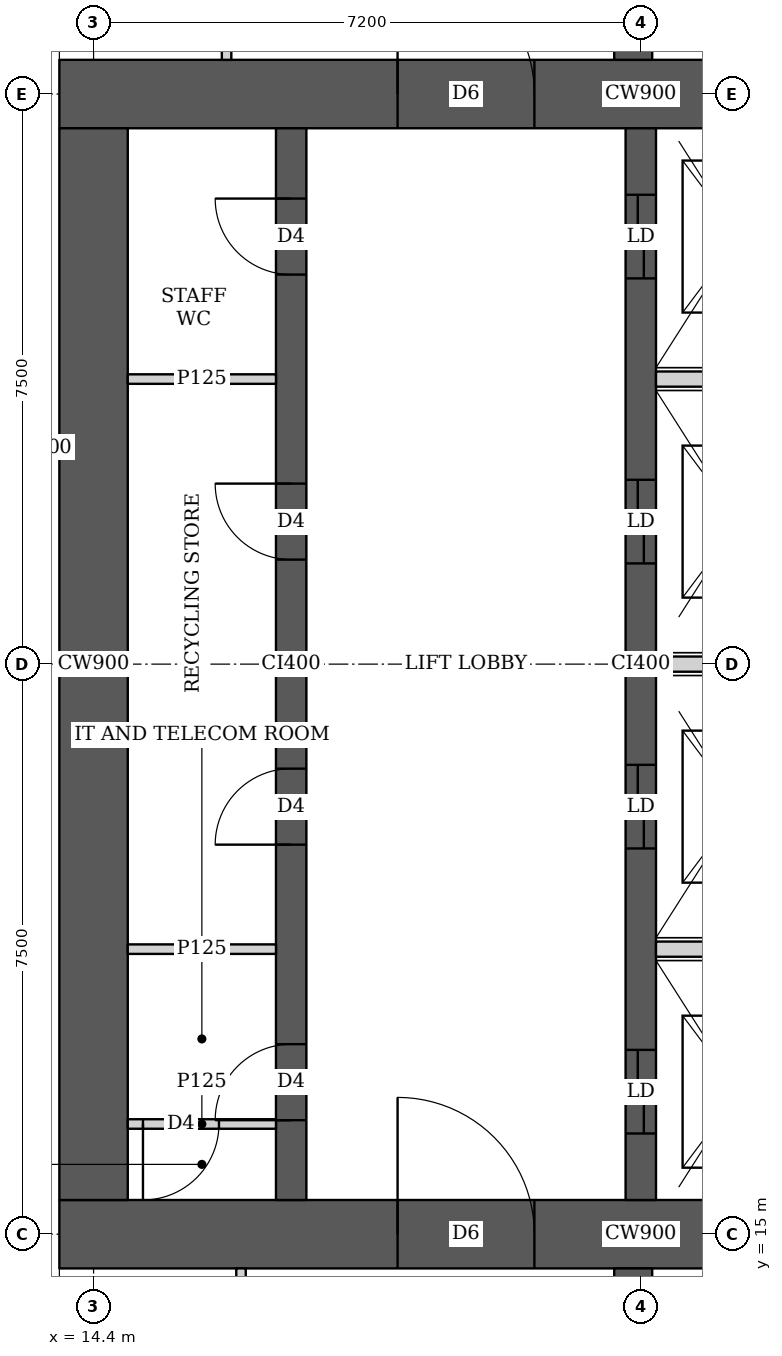
"""IFC4 building model, lengths in metres.
Left out: names, types, materials, properties, quantities, classifications, styles, units other than length and angle.
Written with IfcOpenShell. Run it as: python <this file> out.ifc"""

import sys

from ifc_helpers import new_model, si_unit, direction, frame, frame_2d, origin, place, context, subcontext, project, spatial, rectangle, extrude, element, fill, save


model = new_model("IFC4")
c1 = context("Model", 3, precision=1e-05, world=origin(), true_north=direction((0.0, 1.0)))
c2 = subcontext(c1, "Body", "Model", "MODEL_VIEW")
j1 = project(units=[si_unit("LENGTHUNIT", "METRE"), si_unit("PLANEANGLEUNIT", "RADIAN")], contexts=[c1])
p1 = place(None, origin())
s1 = spatial("IfcSite", under=j1, at=p1, CompositionType="ELEMENT")
p2 = place(p1, origin())
s2 = spatial("IfcBuilding", under=s1, at=p2, CompositionType="ELEMENT")
p3 = place(p2, frame((0.0, 0.0, 292.85)))
s3 = spatial("IfcBuildingStorey", under=s2, at=p3, CompositionType="ELEMENT", Elevation=292.85)
p4 = place(p3, frame((13.95, 15.0, 0.0), z_axis=(0.0, 0.0, 1.0), x_axis=(1.0, 0.0, 0.0)))
e1 = element("IfcWall", 1, at=p4, inside=s3, PredefinedType="SHEAR", context=c2, shape_type="SweptSolid", body=[
    extrude(rectangle(XDim=15.3, YDim=0.9, at=frame_2d((7.65, 0.0))), origin(), (0.0, 0.0, 1.0), 3.75),
])
p5 = place(p4, frame((4.45, 0.0, 0.0)))
e2 = element("IfcOpeningElement", 2, at=p5, cuts=e1, PredefinedType="OPENING", context=c2, shape_type="SweptSolid", body=[
    extrude(rectangle(XDim=1.8, YDim=2.1, at=frame_2d((0.9, 1.05))), frame((0.0, 0.46, 0.0), z_axis=(0.0, -1.0, 0.0), x_axis=(1.0, 0.0, 0.0)), (0.0, 0.0, 1.0), 0.92),
])
p6 = place(p4, frame((10.7, 0.0, 0.0)))
e3 = element("IfcOpeningElement", 3, at=p6, cuts=e1, PredefinedType="OPENING", context=c2, shape_type="SweptSolid", body=[
    extrude(rectangle(XDim=1.1, YDim=2.1, at=frame_2d((0.55, 1.05))), frame((0.0, 0.46, 0.0), z_axis=(0.0, -1.0, 0.0), x_axis=(1.0, 0.0, 0.0)), (0.0, 0.0, 1.0), 0.92),
])
p7 = place(p3, frame((13.95, 30.0, 0.0), z_axis=(0.0, 0.0, 1.0), x_axis=(1.0, 0.0, 0.0)))
e4 = element("IfcWall", 4, at=p7, inside=s3, PredefinedType="SHEAR", context=c2, shape_type="SweptSolid", body=[
    extrude(rectangle(XDim=15.3, YDim=0.9, at=frame_2d((7.65, 0.0))), origin(), (0.0, 0.0, 1.0), 3.75),
])
p8 = place(p7, frame((4.45, 0.0, 0.0)))
e5 = element("IfcOpeningElement", 5, at=p8, cuts=e4, PredefinedType="OPENING", context=c2, shape_type="SweptSolid", body=[
    extrude(rectangle(XDim=1.8, YDim=2.1, at=frame_2d((0.9, 1.05))), frame((0.0, 0.46, 0.0), z_axis=(0.0, -1.0, 0.0), x_axis=(1.0, 0.0, 0.0)), (0.0, 0.0, 1.0), 0.92),
])
p9 = place(p7, frame((10.7, 0.0, 0.0)))
e6 = element("IfcOpeningElement", 6, at=p9, cuts=e4, PredefinedType="OPENING", context=c2, shape_type="SweptSolid", body=[
    extrude(rectangle(XDim=1.1, YDim=2.1, at=frame_2d((0.55, 1.05))), frame((0.0, 0.46, 0.0), z_axis=(0.0, -1.0, 0.0), x_axis=(1.0, 0.0, 0.0)), (0.0, 0.0, 1.0), 0.92),
])
p10 = place(p3, frame((14.4, 15.45, 0.0), z_axis=(0.0, 0.0, 1.0), x_axis=(0.0, 1.0, 0.0)))
e7 = element("IfcWall", 7, at=p10, inside=s3, PredefinedType="SHEAR", context=c2, shape_type="SweptSolid", body=[
    extrude(rectangle(XDim=14.1, YDim=0.9, at=frame_2d((7.05, 0.0))), origin(), (0.0, 0.0, 1.0), 3.75),
])
p11 = place(p3, frame((17.0, 15.45, 0.0), z_axis=(0.0, 0.0, 1.0), x_axis=(0.0, 1.0, 0.0)))
e8 = element("IfcWall", 8, at=p11, inside=s3, PredefinedType="SHEAR", context=c2, shape_type="SweptSolid", body=[
    extrude(rectangle(XDim=14.1, YDim=0.4, at=frame_2d((7.05, 0.0))), origin(), (0.0, 0.0, 1.0), 3.75),
])
p12 = place(p11, frame((1.05, 0.0, 0.0)))
e9 = element("IfcOpeningElement", 9, at=p12, cuts=e8, PredefinedType="OPENING", context=c2, shape_type="SweptSolid", body=[
    extrude(rectangle(XDim=1.0, YDim=2.1, at=frame_2d((0.5, 1.05))), frame((0.0, 0.21, 0.0), z_axis=(0.0, -1.0, 0.0), x_axis=(1.0, 0.0, 0.0)), (0.0, 0.0, 1.0), 0.42),
])
p13 = place(p11, frame((4.675, 0.0, 0.0)))
e10 = element("IfcOpeningElement", 10, at=p13, cuts=e8, PredefinedType="OPENING", context=c2, shape_type="SweptSolid", body=[
    extrude(rectangle(XDim=1.0, YDim=2.1, at=frame_2d((0.5, 1.05))), frame((0.0, 0.21, 0.0), z_axis=(0.0, -1.0, 0.0), x_axis=(1.0, 0.0, 0.0)), (0.0, 0.0, 1.0), 0.42),
])
p14 = place(p11, frame((8.425, 0.0, 0.0)))
e11 = element("IfcOpeningElement", 11, at=p14, cuts=e8, PredefinedType="OPENING", context=c2, shape_type="SweptSolid", body=[
    extrude(rectangle(XDim=1.0, YDim=2.1, at=frame_2d((0.5, 1.05))), frame((0.0, 0.21, 0.0), z_axis=(0.0, -1.0, 0.0), x_axis=(1.0, 0.0, 0.0)), (0.0, 0.0, 1.0), 0.42),
])
p15 = place(p11, frame((12.175, 0.0, 0.0)))
e12 = element("IfcOpeningElement", 12, at=p15, cuts=e8, PredefinedType="OPENING", context=c2, shape_type="SweptSolid", body=[
    extrude(rectangle(XDim=1.0, YDim=2.1, at=frame_2d((0.5, 1.05))), frame((0.0, 0.21, 0.0), z_axis=(0.0, -1.0, 0.0), x_axis=(1.0, 0.0, 0.0)), (0.0, 0.0, 1.0), 0.42),
])
p16 = place(p3, frame((21.6, 15.45, 0.0), z_axis=(0.0, 0.0, 1.0), x_axis=(0.0, 1.0, 0.0)))
e13 = element("IfcWall", 13, at=p16, inside=s3, PredefinedType="SHEAR", context=c2, shape_type="SweptSolid", body=[
    extrude(rectangle(XDim=14.1, YDim=0.4, at=frame_2d((7.05, 0.0))), origin(), (0.0, 0.0, 1.0), 3.75),
])
p17 = place(p16, frame((0.875, 0.0, 0.0)))
e14 = element("IfcOpeningElement", 14, at=p17, cuts=e13, PredefinedType="OPENING", context=c2, shape_type="SweptSolid", body=[
    extrude(rectangle(XDim=1.1, YDim=2.1, at=frame_2d((0.55, 1.05))), frame((0.0, 0.21, 0.0), z_axis=(0.0, -1.0, 0.0), x_axis=(1.0, 0.0, 0.0)), (0.0, 0.0, 1.0), 0.42),
])
p18 = place(p16, frame((4.625, 0.0, 0.0)))
e15 = element("IfcOpeningElement", 15, at=p18, cuts=e13, PredefinedType="OPENING", context=c2, shape_type="SweptSolid", body=[
    extrude(rectangle(XDim=1.1, YDim=2.1, at=frame_2d((0.55, 1.05))), frame((0.0, 0.21, 0.0), z_axis=(0.0, -1.0, 0.0), x_axis=(1.0, 0.0, 0.0)), (0.0, 0.0, 1.0), 0.42),
])
p19 = place(p16, frame((8.375, 0.0, 0.0)))
e16 = element("IfcOpeningElement", 16, at=p19, cuts=e13, PredefinedType="OPENING", context=c2, shape_type="SweptSolid", body=[
    extrude(rectangle(XDim=1.1, YDim=2.1, at=frame_2d((0.55, 1.05))), frame((0.0, 0.21, 0.0), z_axis=(0.0, -1.0, 0.0), x_axis=(1.0, 0.0, 0.0)), (0.0, 0.0, 1.0), 0.42),
])
p20 = place(p16, frame((12.125, 0.0, 0.0)))
e17 = element("IfcOpeningElement", 17, at=p20, cuts=e13, PredefinedType="OPENING", context=c2, shape_type="SweptSolid", body=[
    extrude(rectangle(XDim=1.1, YDim=2.1, at=frame_2d((0.55, 1.05))), frame((0.0, 0.21, 0.0), z_axis=(0.0, -1.0, 0.0), x_axis=(1.0, 0.0, 0.0)), (0.0, 0.0, 1.0), 0.42),
])
for number, where, z_axis, x_axis in (
    (18, (21.5, 10.35, 0.0), (0.0, 0.0, 1.0), (0.0, 1.0, 0.0)),
    (19, (21.5, 30.45, 0.0), (0.0, 0.0, 1.0), (0.0, 1.0, 0.0)),
):
    element("IfcWall", number, at=place(p3, frame(where, z_axis=z_axis, x_axis=x_axis)), inside=s3, PredefinedType="SHEAR", context=c2, shape_type="SweptSolid", body=[
        extrude(rectangle(XDim=4.2, YDim=0.5, at=frame_2d((2.1, 0.0))), origin(), (0.0, 0.0, 1.0), 3.75),
    ])
p21 = place(p3, frame((16.34, 10.562, 0.0), z_axis=(0.0, 0.0, 1.0), x_axis=(0.0, 1.0, 0.0)))
e20 = element("IfcWall", 20, at=p21, inside=s3, PredefinedType="PARTITIONING", context=c2, shape_type="SweptSolid", body=[
    extrude(rectangle(XDim=3.988, YDim=0.125, at=frame_2d((1.994, 0.0))), origin(), (0.0, 0.0, 1.0), 3.4),
])
p22 = place(p21, frame((1.438, 0.0, 0.0)))
e21 = element("IfcOpeningElement", 21, at=p22, cuts=e20, PredefinedType="OPENING", context=c2, shape_type="SweptSolid", body=[
    extrude(rectangle(XDim=1.0, YDim=2.1, at=frame_2d((0.5, 1.05))), frame((0.0, 0.073, 0.0), z_axis=(0.0, -1.0, 0.0), x_axis=(1.0, 0.0, 0.0)), (0.0, 0.0, 1.0), 0.145),
])
p23 = place(p3, frame((16.15, 30.45, 0.0), z_axis=(0.0, 0.0, 1.0), x_axis=(0.0, 1.0, 0.0)))
e22 = element("IfcWall", 22, at=p23, inside=s3, PredefinedType="PARTITIONING", context=c2, shape_type="SweptSolid", body=[
    extrude(rectangle(XDim=4.387, YDim=0.125, at=frame_2d((2.193, 0.0))), origin(), (0.0, 0.0, 1.0), 3.4),
])
p24 = place(p23, frame((1.75, 0.0, 0.0)))
e23 = element("IfcOpeningElement", 23, at=p24, cuts=e22, PredefinedType="OPENING", context=c2, shape_type="SweptSolid", body=[
    extrude(rectangle(XDim=1.0, YDim=2.1, at=frame_2d((0.5, 1.05))), frame((0.0, 0.073, 0.0), z_axis=(0.0, -1.0, 0.0), x_axis=(1.0, 0.0, 0.0)), (0.0, 0.0, 1.0), 0.145),
])
p25 = place(p3, frame((14.85, 16.45, 0.0), z_axis=(0.0, 0.0, 1.0), x_axis=(1.0, 0.0, 0.0)))
e24 = element("IfcWall", 24, at=p25, inside=s3, PredefinedType="PARTITIONING", context=c2, shape_type="SweptSolid", body=[
    extrude(rectangle(XDim=1.95, YDim=0.125, at=frame_2d((0.975, 0.0))), origin(), (0.0, 0.0, 1.0), 3.4),
])
p26 = place(p25, frame((0.2, 0.0, 0.0)))
e25 = element("IfcOpeningElement", 25, at=p26, cuts=e24, PredefinedType="OPENING", context=c2, shape_type="SweptSolid", body=[
    extrude(rectangle(XDim=1.0, YDim=2.1, at=frame_2d((0.5, 1.05))), frame((0.0, 0.073, 0.0), z_axis=(0.0, -1.0, 0.0), x_axis=(1.0, 0.0, 0.0)), (0.0, 0.0, 1.0), 0.145),
])
for number, where, z_axis, x_axis in (
    (26, (14.85, 18.75, 0.0), (0.0, 0.0, 1.0), (1.0, 0.0, 0.0)),
    (27, (14.85, 26.25, 0.0), (0.0, 0.0, 1.0), (1.0, 0.0, 0.0)),
):
    element("IfcWall", number, at=place(p3, frame(where, z_axis=z_axis, x_axis=x_axis)), inside=s3, PredefinedType="PARTITIONING", context=c2, shape_type="SweptSolid", body=[
        extrude(rectangle(XDim=1.95, YDim=0.125, at=frame_2d((0.975, 0.0))), origin(), (0.0, 0.0, 1.0), 3.4),
    ])
for number, where, z_axis, x_axis in (
    (28, (21.8, 18.75, 0.0), (0.0, 0.0, 1.0), (1.0, 0.0, 0.0)),
    (29, (21.8, 22.5, 0.0), (0.0, 0.0, 1.0), (1.0, 0.0, 0.0)),
    (30, (21.8, 26.25, 0.0), (0.0, 0.0, 1.0), (1.0, 0.0, 0.0)),
):
    element("IfcWall", number, at=place(p3, frame(where, z_axis=z_axis, x_axis=x_axis)), inside=s3, PredefinedType="SOLIDWALL", context=c2, shape_type="SweptSolid", body=[
        extrude(rectangle(XDim=2.2, YDim=0.2, at=frame_2d((1.1, 0.0))), origin(), (0.0, 0.0, 1.0), 3.4),
    ])
p27 = place(p26, origin())
e31 = element("IfcDoor", 31, at=p27, inside=s3, OperationType="SINGLE_SWING_RIGHT", PredefinedType="DOOR", context=c2, shape_type="SweptSolid", body=[
    extrude(rectangle(XDim=1.0, YDim=2.1, at=frame_2d((0.5, 1.05))), frame((0.0, 0.025, 0.0), z_axis=(0.0, -1.0, 0.0), x_axis=(1.0, 0.0, 0.0)), (0.0, 0.0, 1.0), 0.05),
])
fill(e25, e31)
p28 = place(p12, origin())
e32 = element("IfcDoor", 32, at=p28, inside=s3, OperationType="SINGLE_SWING_LEFT", PredefinedType="DOOR", context=c2, shape_type="SweptSolid", body=[
    extrude(rectangle(XDim=1.0, YDim=2.1, at=frame_2d((0.5, 1.05))), frame((0.0, 0.025, 0.0), z_axis=(0.0, -1.0, 0.0), x_axis=(1.0, 0.0, 0.0)), (0.0, 0.0, 1.0), 0.05),
])
fill(e9, e32)
p29 = place(p13, origin())
e33 = element("IfcDoor", 33, at=p29, inside=s3, OperationType="SINGLE_SWING_LEFT", PredefinedType="DOOR", context=c2, shape_type="SweptSolid", body=[
    extrude(rectangle(XDim=1.0, YDim=2.1, at=frame_2d((0.5, 1.05))), frame((0.0, 0.025, 0.0), z_axis=(0.0, -1.0, 0.0), x_axis=(1.0, 0.0, 0.0)), (0.0, 0.0, 1.0), 0.05),
])
fill(e10, e33)
p30 = place(p14, origin())
e34 = element("IfcDoor", 34, at=p30, inside=s3, OperationType="SINGLE_SWING_RIGHT", PredefinedType="DOOR", context=c2, shape_type="SweptSolid", body=[
    extrude(rectangle(XDim=1.0, YDim=2.1, at=frame_2d((0.5, 1.05))), frame((0.0, 0.025, 0.0), z_axis=(0.0, -1.0, 0.0), x_axis=(1.0, 0.0, 0.0)), (0.0, 0.0, 1.0), 0.05),
])
fill(e11, e34)
p31 = place(p15, origin())
e35 = element("IfcDoor", 35, at=p31, inside=s3, OperationType="SINGLE_SWING_RIGHT", PredefinedType="DOOR", context=c2, shape_type="SweptSolid", body=[
    extrude(rectangle(XDim=1.0, YDim=2.1, at=frame_2d((0.5, 1.05))), frame((0.0, 0.025, 0.0), z_axis=(0.0, -1.0, 0.0), x_axis=(1.0, 0.0, 0.0)), (0.0, 0.0, 1.0), 0.05),
])
fill(e12, e35)
p32 = place(p5, origin())
e36 = element("IfcDoor", 36, at=p32, inside=s3, OperationType="DOUBLE_DOOR_SINGLE_SWING", PredefinedType="DOOR", context=c2, shape_type="SweptSolid", body=[
    extrude(rectangle(XDim=1.8, YDim=2.1, at=frame_2d((0.9, 1.05))), frame((0.0, 0.025, 0.0), z_axis=(0.0, -1.0, 0.0), x_axis=(1.0, 0.0, 0.0)), (0.0, 0.0, 1.0), 0.05),
])
fill(e2, e36)
p33 = place(p8, origin())
e37 = element("IfcDoor", 37, at=p33, inside=s3, OperationType="DOUBLE_DOOR_SINGLE_SWING", PredefinedType="DOOR", context=c2, shape_type="SweptSolid", body=[
    extrude(rectangle(XDim=1.8, YDim=2.1, at=frame_2d((0.9, 1.05))), frame((0.0, 0.025, 0.0), z_axis=(0.0, -1.0, 0.0), x_axis=(1.0, 0.0, 0.0)), (0.0, 0.0, 1.0), 0.05),
])
fill(e5, e37)
p34 = place(p17, origin())
e38 = element("IfcDoor", 38, at=p34, inside=s3, OperationType="DOUBLE_DOOR_SLIDING", PredefinedType="DOOR", context=c2, shape_type="SweptSolid", body=[
    extrude(rectangle(XDim=1.1, YDim=2.1, at=frame_2d((0.55, 1.05))), frame((0.0, 0.025, 0.0), z_axis=(0.0, -1.0, 0.0), x_axis=(1.0, 0.0, 0.0)), (0.0, 0.0, 1.0), 0.05),
])
fill(e14, e38)
p35 = place(p18, origin())
e39 = element("IfcDoor", 39, at=p35, inside=s3, OperationType="DOUBLE_DOOR_SLIDING", PredefinedType="DOOR", context=c2, shape_type="SweptSolid", body=[
    extrude(rectangle(XDim=1.1, YDim=2.1, at=frame_2d((0.55, 1.05))), frame((0.0, 0.025, 0.0), z_axis=(0.0, -1.0, 0.0), x_axis=(1.0, 0.0, 0.0)), (0.0, 0.0, 1.0), 0.05),
])
fill(e15, e39)
p36 = place(p19, origin())
e40 = element("IfcDoor", 40, at=p36, inside=s3, OperationType="DOUBLE_DOOR_SLIDING", PredefinedType="DOOR", context=c2, shape_type="SweptSolid", body=[
    extrude(rectangle(XDim=1.1, YDim=2.1, at=frame_2d((0.55, 1.05))), frame((0.0, 0.025, 0.0), z_axis=(0.0, -1.0, 0.0), x_axis=(1.0, 0.0, 0.0)), (0.0, 0.0, 1.0), 0.05),
])
fill(e16, e40)
p37 = place(p20, origin())
e41 = element("IfcDoor", 41, at=p37, inside=s3, OperationType="DOUBLE_DOOR_SLIDING", PredefinedType="DOOR", context=c2, shape_type="SweptSolid", body=[
    extrude(rectangle(XDim=1.1, YDim=2.1, at=frame_2d((0.55, 1.05))), frame((0.0, 0.025, 0.0), z_axis=(0.0, -1.0, 0.0), x_axis=(1.0, 0.0, 0.0)), (0.0, 0.0, 1.0), 0.05),
])
fill(e17, e41)
save(model, sys.argv[1])
